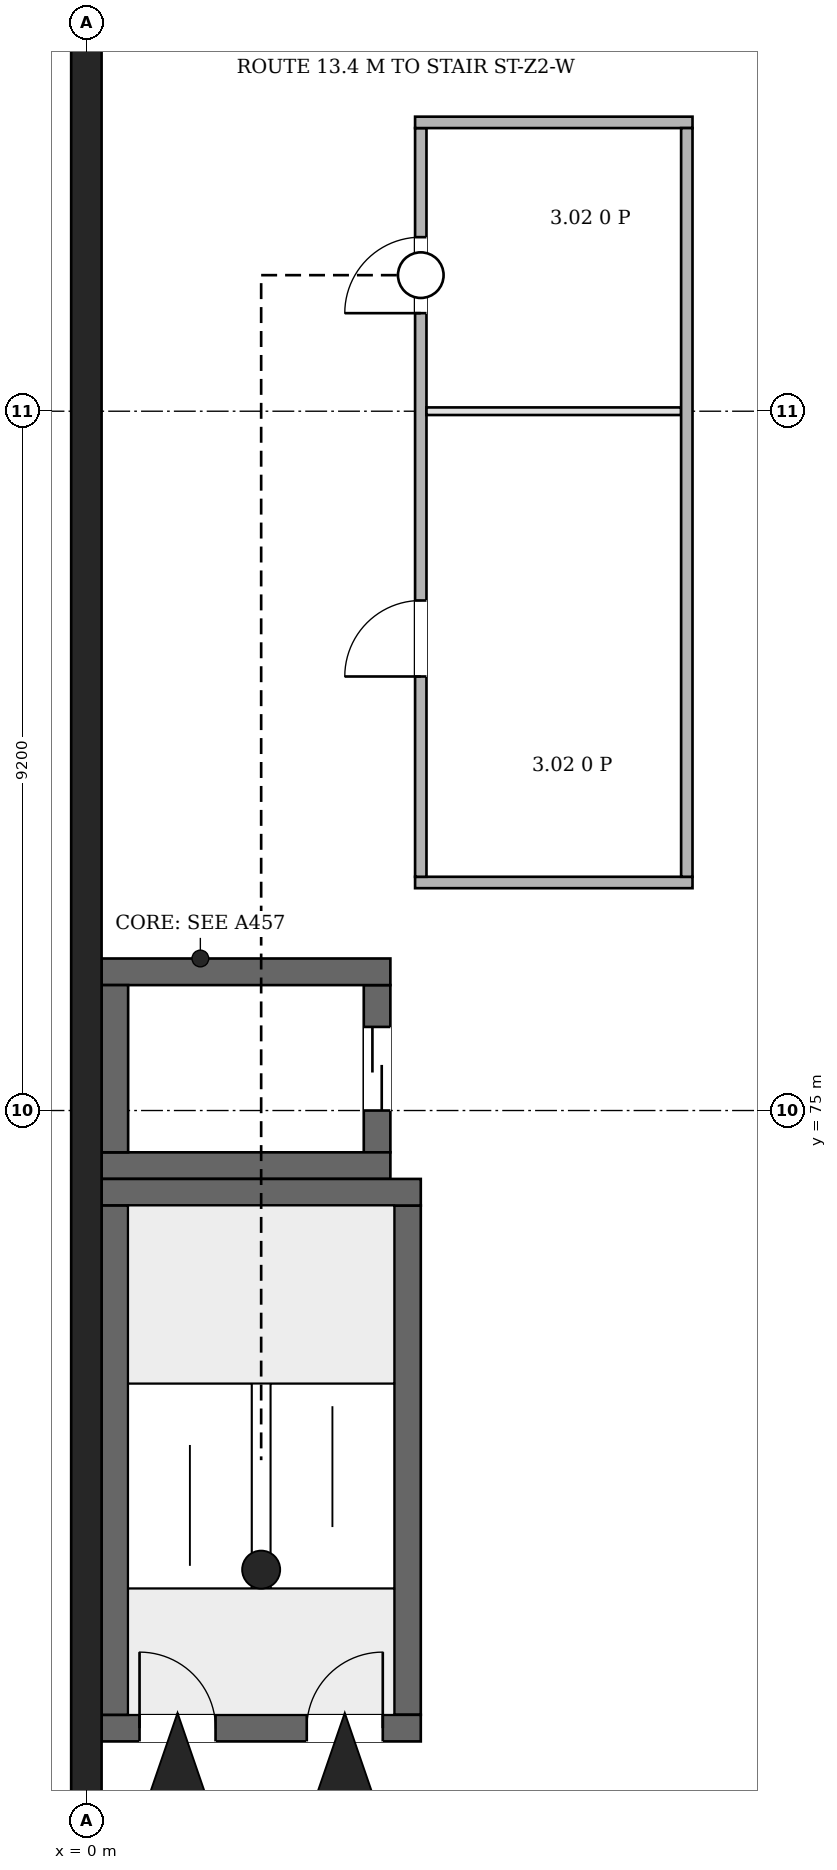
"""IFC4 building model, lengths in metres.
Left out: names, types, materials, properties, quantities, classifications, styles, units other than length and angle.
Written with IfcOpenShell. Run it as: python <this file> out.ifc"""

import sys

from ifc_helpers import new_model, si_unit, direction, frame, frame_2d, origin, place, context, subcontext, project, spatial, rectangle, extrude, element, fill, save


model = new_model("IFC4")
c1 = context("Model", 3, precision=1e-05, world=origin(), true_north=direction((0.0, 1.0)))
c2 = subcontext(c1, "Body", "Model", "MODEL_VIEW")
j1 = project(units=[si_unit("LENGTHUNIT", "METRE"), si_unit("PLANEANGLEUNIT", "RADIAN")], contexts=[c1])
p1 = place(None, origin())
s1 = spatial("IfcSite", under=j1, at=p1, CompositionType="ELEMENT")
p2 = place(p1, origin())
s2 = spatial("IfcBuilding", under=s1, at=p2, CompositionType="ELEMENT")
p3 = place(p2, frame((0.0, 0.0, 21.7)))
s3 = spatial("IfcBuildingStorey", under=s2, at=p3, CompositionType="ELEMENT", Elevation=21.7)
p4 = place(p3, frame((0.0, 46.72, 0.0), z_axis=(0.0, 0.0, 1.0), x_axis=(0.0, 1.0, 0.0)))
e1 = element("IfcWall", 1, at=p4, inside=s3, PredefinedType="SHEAR", context=c2, shape_type="SweptSolid", body=[
    extrude(rectangle(XDim=47.36, YDim=0.4, at=frame_2d((23.68, 0.0))), origin(), (0.0, 0.0, 1.0), 5.0),
])
p5 = place(p3, frame((0.2, 66.875, 0.0), z_axis=(0.0, 0.0, 1.0), x_axis=(1.0, 0.0, 0.0)))
e2 = element("IfcWall", 2, at=p5, inside=s3, PredefinedType="SHEAR", context=c2, shape_type="SweptSolid", body=[
    extrude(rectangle(XDim=4.2, YDim=0.35, at=frame_2d((2.1, 0.0))), origin(), (0.0, 0.0, 1.0), 5.0),
])
p6 = place(p5, frame((0.5, 0.0, 0.0)))
e3 = element("IfcOpeningElement", 3, at=p6, cuts=e2, PredefinedType="OPENING", context=c2, shape_type="SweptSolid", body=[
    extrude(rectangle(XDim=1.0, YDim=2.1, at=frame_2d((0.5, 1.05))), frame((0.0, 0.185, 0.0), z_axis=(0.0, -1.0, 0.0), x_axis=(1.0, 0.0, 0.0)), (0.0, 0.0, 1.0), 0.37),
])
p7 = place(p5, frame((2.7, 0.0, 0.0)))
e4 = element("IfcOpeningElement", 4, at=p7, cuts=e2, PredefinedType="OPENING", context=c2, shape_type="SweptSolid", body=[
    extrude(rectangle(XDim=1.0, YDim=2.1, at=frame_2d((0.5, 1.05))), frame((0.0, 0.185, 0.0), z_axis=(0.0, -1.0, 0.0), x_axis=(1.0, 0.0, 0.0)), (0.0, 0.0, 1.0), 0.37),
])
p8 = place(p3, frame((0.2, 73.925, 0.0), z_axis=(0.0, 0.0, 1.0), x_axis=(1.0, 0.0, 0.0)))
e5 = element("IfcWall", 5, at=p8, inside=s3, PredefinedType="SHEAR", context=c2, shape_type="SweptSolid", body=[
    extrude(rectangle(XDim=4.2, YDim=0.35, at=frame_2d((2.1, 0.0))), origin(), (0.0, 0.0, 1.0), 5.0),
])
for number, where, z_axis, x_axis in (
    (6, (0.375, 67.05, 0.0), (0.0, 0.0, 1.0), (0.0, 1.0, 0.0)),
    (7, (4.225, 67.05, 0.0), (0.0, 0.0, 1.0), (0.0, 1.0, 0.0)),
):
    element("IfcWall", number, at=place(p3, frame(where, z_axis=z_axis, x_axis=x_axis)), inside=s3, PredefinedType="SHEAR", context=c2, shape_type="SweptSolid", body=[
        extrude(rectangle(XDim=6.7, YDim=0.35, at=frame_2d((3.35, 0.0))), origin(), (0.0, 0.0, 1.0), 5.0),
    ])
for number, where, z_axis, x_axis in (
    (8, (0.2, 74.275, 0.0), (0.0, 0.0, 1.0), (1.0, 0.0, 0.0)),
    (9, (0.2, 76.825, 0.0), (0.0, 0.0, 1.0), (1.0, 0.0, 0.0)),
):
    element("IfcWall", number, at=place(p3, frame(where, z_axis=z_axis, x_axis=x_axis)), inside=s3, PredefinedType="SHEAR", context=c2, shape_type="SweptSolid", body=[
        extrude(rectangle(XDim=3.8, YDim=0.35, at=frame_2d((1.9, 0.0))), origin(), (0.0, 0.0, 1.0), 5.0),
    ])
p9 = place(p3, frame((0.375, 74.45, 0.0), z_axis=(0.0, 0.0, 1.0), x_axis=(0.0, 1.0, 0.0)))
e10 = element("IfcWall", 10, at=p9, inside=s3, PredefinedType="SHEAR", context=c2, shape_type="SweptSolid", body=[
    extrude(rectangle(XDim=2.2, YDim=0.35, at=frame_2d((1.1, 0.0))), origin(), (0.0, 0.0, 1.0), 5.0),
])
p10 = place(p3, frame((3.825, 74.45, 0.0), z_axis=(0.0, 0.0, 1.0), x_axis=(0.0, 1.0, 0.0)))
e11 = element("IfcWall", 11, at=p10, inside=s3, PredefinedType="SHEAR", context=c2, shape_type="SweptSolid", body=[
    extrude(rectangle(XDim=2.2, YDim=0.35, at=frame_2d((1.1, 0.0))), origin(), (0.0, 0.0, 1.0), 5.0),
])
p11 = place(p10, frame((0.55, 0.0, 0.0)))
e12 = element("IfcOpeningElement", 12, at=p11, cuts=e11, PredefinedType="OPENING", context=c2, shape_type="SweptSolid", body=[
    extrude(rectangle(XDim=1.1, YDim=2.1, at=frame_2d((0.55, 1.05))), frame((0.0, 0.185, 0.0), z_axis=(0.0, -1.0, 0.0), x_axis=(1.0, 0.0, 0.0)), (0.0, 0.0, 1.0), 0.37),
])
p12 = place(p3, frame((4.325, 78.0, 0.0), z_axis=(0.0, 0.0, 1.0), x_axis=(1.0, 0.0, 0.0)))
e13 = element("IfcWall", 13, at=p12, inside=s3, PredefinedType="PARTITIONING", context=c2, shape_type="SweptSolid", body=[
    extrude(rectangle(XDim=3.65, YDim=0.15, at=frame_2d((1.825, 0.0))), origin(), (0.0, 0.0, 1.0), 4.65),
])
p13 = place(p3, frame((4.4, 78.075, 0.0), z_axis=(0.0, 0.0, 1.0), x_axis=(0.0, 1.0, 0.0)))
e14 = element("IfcWall", 14, at=p13, inside=s3, PredefinedType="PARTITIONING", context=c2, shape_type="SweptSolid", body=[
    extrude(rectangle(XDim=9.85, YDim=0.15, at=frame_2d((4.925, 0.0))), origin(), (0.0, 0.0, 1.0), 4.65),
])
p14 = place(p13, frame((2.635, 0.0, 0.0)))
e15 = element("IfcOpeningElement", 15, at=p14, cuts=e14, PredefinedType="OPENING", context=c2, shape_type="SweptSolid", body=[
    extrude(rectangle(XDim=1.0, YDim=2.1, at=frame_2d((0.5, 1.05))), frame((0.0, 0.085, 0.0), z_axis=(0.0, -1.0, 0.0), x_axis=(1.0, 0.0, 0.0)), (0.0, 0.0, 1.0), 0.17),
])
p15 = place(p13, frame((7.415, 0.0, 0.0)))
e16 = element("IfcOpeningElement", 16, at=p15, cuts=e14, PredefinedType="OPENING", context=c2, shape_type="SweptSolid", body=[
    extrude(rectangle(XDim=1.0, YDim=2.1, at=frame_2d((0.5, 1.05))), frame((0.0, 0.085, 0.0), z_axis=(0.0, -1.0, 0.0), x_axis=(1.0, 0.0, 0.0)), (0.0, 0.0, 1.0), 0.17),
])
p16 = place(p3, frame((4.325, 88.0, 0.0), z_axis=(0.0, 0.0, 1.0), x_axis=(1.0, 0.0, 0.0)))
e17 = element("IfcWall", 17, at=p16, inside=s3, PredefinedType="PARTITIONING", context=c2, shape_type="SweptSolid", body=[
    extrude(rectangle(XDim=3.65, YDim=0.15, at=frame_2d((1.825, 0.0))), origin(), (0.0, 0.0, 1.0), 4.65),
])
p17 = place(p3, frame((4.475, 84.2, 0.0), z_axis=(0.0, 0.0, 1.0), x_axis=(1.0, 0.0, 0.0)))
e18 = element("IfcWall", 18, at=p17, inside=s3, PredefinedType="PARTITIONING", context=c2, shape_type="SweptSolid", body=[
    extrude(rectangle(XDim=3.35, YDim=0.1, at=frame_2d((1.675, 0.0))), origin(), (0.0, 0.0, 1.0), 4.25),
])
p18 = place(p3, frame((7.9, 78.075, 0.0), z_axis=(0.0, 0.0, 1.0), x_axis=(0.0, 1.0, 0.0)))
e19 = element("IfcWall", 19, at=p18, inside=s3, PredefinedType="PARTITIONING", context=c2, shape_type="SweptSolid", body=[
    extrude(rectangle(XDim=9.85, YDim=0.15, at=frame_2d((4.925, 0.0))), origin(), (0.0, 0.0, 1.0), 4.65),
])
p19 = place(p6, origin())
e20 = element("IfcDoor", 20, at=p19, inside=s3, OperationType="SINGLE_SWING_RIGHT", PredefinedType="DOOR", context=c2, shape_type="SweptSolid", body=[
    extrude(rectangle(XDim=1.0, YDim=2.1, at=frame_2d((0.5, 1.05))), frame((0.0, 0.025, 0.0), z_axis=(0.0, -1.0, 0.0), x_axis=(1.0, 0.0, 0.0)), (0.0, 0.0, 1.0), 0.05),
])
fill(e3, e20)
p20 = place(p7, origin())
e21 = element("IfcDoor", 21, at=p20, inside=s3, OperationType="SINGLE_SWING_LEFT", PredefinedType="DOOR", context=c2, shape_type="SweptSolid", body=[
    extrude(rectangle(XDim=1.0, YDim=2.1, at=frame_2d((0.5, 1.05))), frame((0.0, 0.025, 0.0), z_axis=(0.0, -1.0, 0.0), x_axis=(1.0, 0.0, 0.0)), (0.0, 0.0, 1.0), 0.05),
])
fill(e4, e21)
p21 = place(p11, origin())
e22 = element("IfcDoor", 22, at=p21, inside=s3, OperationType="DOUBLE_DOOR_SLIDING", PredefinedType="DOOR", context=c2, shape_type="SweptSolid", body=[
    extrude(rectangle(XDim=1.1, YDim=2.1, at=frame_2d((0.55, 1.05))), frame((0.0, 0.025, 0.0), z_axis=(0.0, -1.0, 0.0), x_axis=(1.0, 0.0, 0.0)), (0.0, 0.0, 1.0), 0.05),
])
fill(e12, e22)
p22 = place(p14, origin())
e23 = element("IfcDoor", 23, at=p22, inside=s3, OperationType="SINGLE_SWING_RIGHT", PredefinedType="DOOR", context=c2, shape_type="SweptSolid", body=[
    extrude(rectangle(XDim=1.0, YDim=2.1, at=frame_2d((0.5, 1.05))), frame((0.0, 0.025, 0.0), z_axis=(0.0, -1.0, 0.0), x_axis=(1.0, 0.0, 0.0)), (0.0, 0.0, 1.0), 0.05),
])
fill(e15, e23)
p23 = place(p15, origin())
e24 = element("IfcDoor", 24, at=p23, inside=s3, OperationType="SINGLE_SWING_LEFT", PredefinedType="DOOR", context=c2, shape_type="SweptSolid", body=[
    extrude(rectangle(XDim=1.0, YDim=2.1, at=frame_2d((0.5, 1.05))), frame((0.0, 0.025, 0.0), z_axis=(0.0, -1.0, 0.0), x_axis=(1.0, 0.0, 0.0)), (0.0, 0.0, 1.0), 0.05),
])
fill(e16, e24)
save(model, sys.argv[1])
